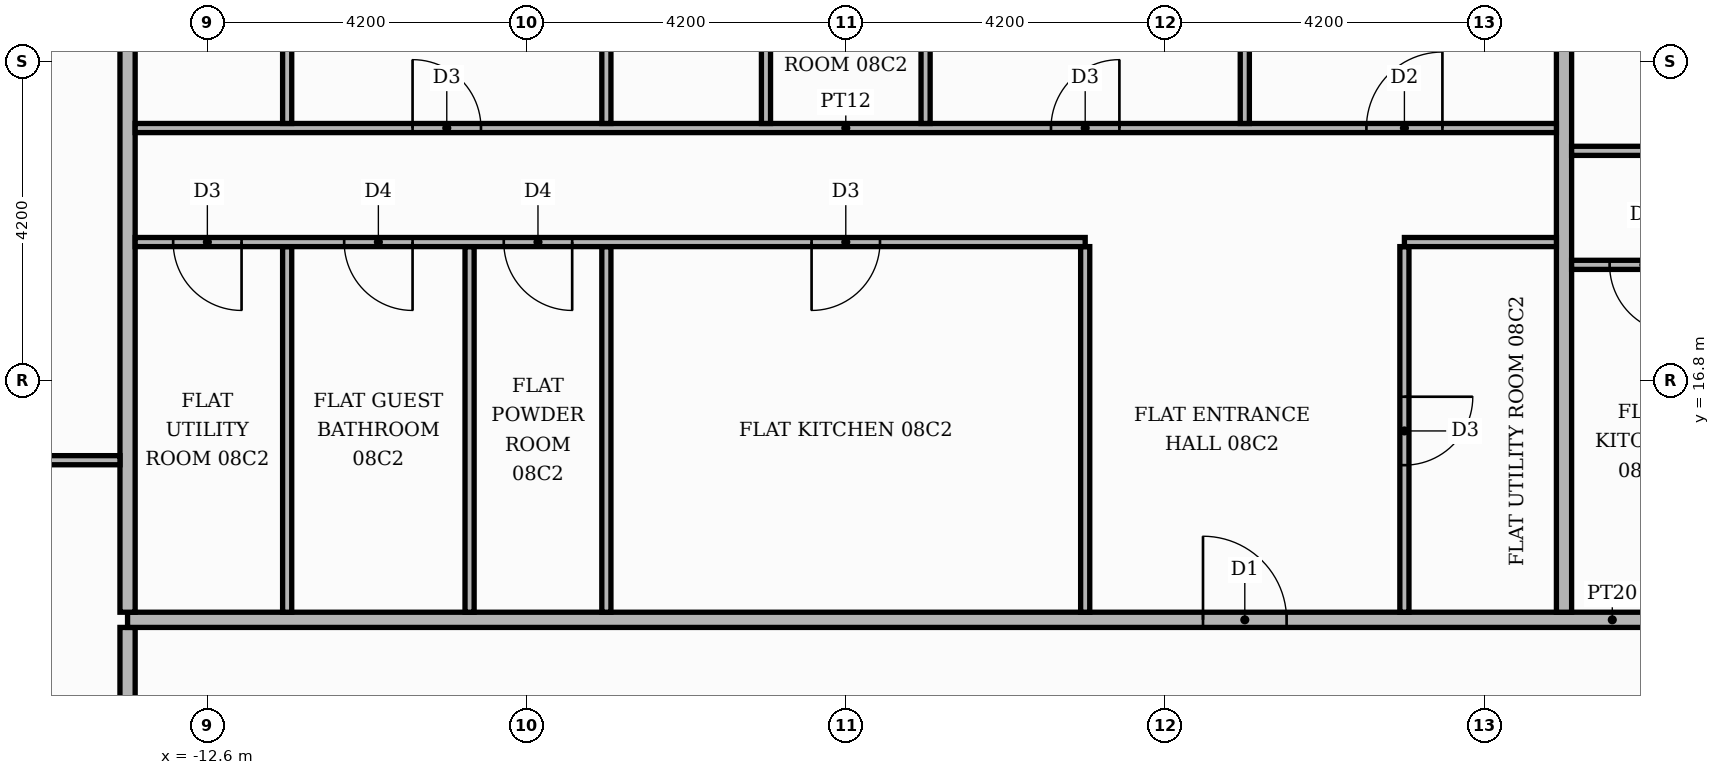
"""IFC4 building model, lengths in metres.
Left out: names, types, materials, properties, quantities, classifications, styles, units other than length and angle.
Written with IfcOpenShell. Run it as: python <this file> out.ifc"""

import sys

from ifc_helpers import new_model, si_unit, direction, frame, frame_2d, origin, place, context, subcontext, project, spatial, rectangle, extrude, element, fill, save


model = new_model("IFC4")
c1 = context("Model", 3, precision=1e-05, world=origin(), true_north=direction((0.0, 1.0)))
c2 = subcontext(c1, "Body", "Model", "MODEL_VIEW")
j1 = project(units=[si_unit("LENGTHUNIT", "METRE"), si_unit("PLANEANGLEUNIT", "RADIAN")], contexts=[c1])
p1 = place(None, origin())
s1 = spatial("IfcSite", under=j1, at=p1, CompositionType="ELEMENT")
p2 = place(p1, origin())
s2 = spatial("IfcBuilding", under=s1, at=p2, CompositionType="ELEMENT")
p3 = place(p2, frame((0.0, 0.0, 38.7)))
s3 = spatial("IfcBuildingStorey", under=s2, at=p3, CompositionType="ELEMENT", Elevation=38.7)
p4 = place(p3, frame((-13.65, -13.55, 0.0), z_axis=(0.0, 0.0, 1.0), x_axis=(0.0, 1.0, 0.0)))
e1 = element("IfcWall", 1, at=p4, inside=s3, PredefinedType="PARTITIONING", context=c2, shape_type="SweptSolid", body=[
    extrude(rectangle(XDim=27.1, YDim=0.2, at=frame_2d((13.55, 0.0))), origin(), (0.0, 0.0, 1.0), 3.48),
])
p5 = place(p4, frame((24.55, 0.0, 0.0)))
e2 = element("IfcOpeningElement", 2, at=p5, cuts=e1, PredefinedType="OPENING", context=c2, shape_type="SweptSolid", body=[
    extrude(rectangle(XDim=1.1, YDim=2.4, at=frame_2d((0.55, 1.2))), frame((0.0, 0.11, 0.0), z_axis=(0.0, -1.0, 0.0), x_axis=(1.0, 0.0, 0.0)), (0.0, 0.0, 1.0), 0.22),
])
p6 = place(p3, frame((-13.65, 13.65, 0.0), z_axis=(0.0, 0.0, 1.0), x_axis=(1.0, 0.0, 0.0)))
e3 = element("IfcWall", 3, at=p6, inside=s3, PredefinedType="PARTITIONING", context=c2, shape_type="SweptSolid", body=[
    extrude(rectangle(XDim=39.07, YDim=0.2, at=frame_2d((19.535, 0.0))), origin(), (0.0, 0.0, 1.0), 3.48),
])
p7 = place(p6, frame((24.65, 0.0, 0.0)))
e4 = element("IfcOpeningElement", 4, at=p7, cuts=e3, PredefinedType="OPENING", context=c2, shape_type="SweptSolid", body=[
    extrude(rectangle(XDim=1.1, YDim=2.4, at=frame_2d((0.55, 1.2))), frame((0.0, 0.11, 0.0), z_axis=(0.0, -1.0, 0.0), x_axis=(1.0, 0.0, 0.0)), (0.0, 0.0, 1.0), 0.22),
])
p8 = place(p6, frame((14.15, 0.0, 0.0)))
e5 = element("IfcOpeningElement", 5, at=p8, cuts=e3, PredefinedType="OPENING", context=c2, shape_type="SweptSolid", body=[
    extrude(rectangle(XDim=1.1, YDim=2.4, at=frame_2d((0.55, 1.2))), frame((0.0, 0.11, 0.0), z_axis=(0.0, -1.0, 0.0), x_axis=(1.0, 0.0, 0.0)), (0.0, 0.0, 1.0), 0.22),
])
p9 = place(p3, frame((-13.65, 13.75, 0.0), z_axis=(0.0, 0.0, 1.0), x_axis=(0.0, 1.0, 0.0)))
e6 = element("IfcWall", 6, at=p9, inside=s3, PredefinedType="PARTITIONING", context=c2, shape_type="SweptSolid", body=[
    extrude(rectangle(XDim=11.67, YDim=0.2, at=frame_2d((5.835, 0.0))), origin(), (0.0, 0.0, 1.0), 3.48),
])
for number, where, z_axis, x_axis in (
    (7, (-11.55, 13.75, 0.0), (0.0, 0.0, 1.0), (0.0, 1.0, 0.0)),
    (8, (-9.15, 13.75, 0.0), (0.0, 0.0, 1.0), (0.0, 1.0, 0.0)),
    (9, (-7.35, 13.75, 0.0), (0.0, 0.0, 1.0), (0.0, 1.0, 0.0)),
    (10, (-1.05, 13.75, 0.0), (0.0, 0.0, 1.0), (0.0, 1.0, 0.0)),
):
    element("IfcWall", number, at=place(p3, frame(where, z_axis=z_axis, x_axis=x_axis)), inside=s3, PredefinedType="PARTITIONING", context=c2, shape_type="SweptSolid", body=[
        extrude(rectangle(XDim=4.81, YDim=0.12, at=frame_2d((2.405, 0.0))), origin(), (0.0, 0.0, 1.0), 3.48),
    ])
p10 = place(p3, frame((3.15, 13.75, 0.0), z_axis=(0.0, 0.0, 1.0), x_axis=(0.0, 1.0, 0.0)))
e11 = element("IfcWall", 11, at=p10, inside=s3, PredefinedType="PARTITIONING", context=c2, shape_type="SweptSolid", body=[
    extrude(rectangle(XDim=4.81, YDim=0.12, at=frame_2d((2.405, 0.0))), origin(), (0.0, 0.0, 1.0), 3.48),
])
p11 = place(p10, frame((1.935, 0.0, 0.0)))
e12 = element("IfcOpeningElement", 12, at=p11, cuts=e11, PredefinedType="OPENING", context=c2, shape_type="SweptSolid", body=[
    extrude(rectangle(XDim=0.9, YDim=2.1, at=frame_2d((0.45, 1.05))), frame((0.0, 0.07, 0.0), z_axis=(0.0, -1.0, 0.0), x_axis=(1.0, 0.0, 0.0)), (0.0, 0.0, 1.0), 0.14),
])
p12 = place(p3, frame((5.25, 13.75, 0.0), z_axis=(0.0, 0.0, 1.0), x_axis=(0.0, 1.0, 0.0)))
e13 = element("IfcWall", 13, at=p12, inside=s3, PredefinedType="PARTITIONING", context=c2, shape_type="SweptSolid", body=[
    extrude(rectangle(XDim=11.67, YDim=0.2, at=frame_2d((5.835, 0.0))), origin(), (0.0, 0.0, 1.0), 3.48),
])
p13 = place(p3, frame((-20.72, 15.75, 0.0), z_axis=(0.0, 0.0, 1.0), x_axis=(1.0, 0.0, 0.0)))
e14 = element("IfcWall", 14, at=p13, inside=s3, PredefinedType="PARTITIONING", context=c2, shape_type="SweptSolid", body=[
    extrude(rectangle(XDim=6.97, YDim=0.12, at=frame_2d((3.485, 0.0))), origin(), (0.0, 0.0, 1.0), 3.48),
])
p14 = place(p13, frame((3.085, 0.0, 0.0)))
e15 = element("IfcOpeningElement", 15, at=p14, cuts=e14, PredefinedType="OPENING", context=c2, shape_type="SweptSolid", body=[
    extrude(rectangle(XDim=0.9, YDim=2.1, at=frame_2d((0.45, 1.05))), frame((0.0, 0.07, 0.0), z_axis=(0.0, -1.0, 0.0), x_axis=(1.0, 0.0, 0.0)), (0.0, 0.0, 1.0), 0.14),
])
p15 = place(p3, frame((5.35, 18.32, 0.0), z_axis=(0.0, 0.0, 1.0), x_axis=(1.0, 0.0, 0.0)))
e16 = element("IfcWall", 16, at=p15, inside=s3, PredefinedType="PARTITIONING", context=c2, shape_type="SweptSolid", body=[
    extrude(rectangle(XDim=4.1, YDim=0.12, at=frame_2d((2.05, 0.0))), origin(), (0.0, 0.0, 1.0), 3.48),
])
p16 = place(p15, frame((0.5, 0.0, 0.0)))
e17 = element("IfcOpeningElement", 17, at=p16, cuts=e16, PredefinedType="OPENING", context=c2, shape_type="SweptSolid", body=[
    extrude(rectangle(XDim=0.9, YDim=2.1, at=frame_2d((0.45, 1.05))), frame((0.0, 0.07, 0.0), z_axis=(0.0, -1.0, 0.0), x_axis=(1.0, 0.0, 0.0)), (0.0, 0.0, 1.0), 0.14),
])
p17 = place(p3, frame((-13.55, 18.62, 0.0), z_axis=(0.0, 0.0, 1.0), x_axis=(1.0, 0.0, 0.0)))
e18 = element("IfcWall", 18, at=p17, inside=s3, PredefinedType="PARTITIONING", context=c2, shape_type="SweptSolid", body=[
    extrude(rectangle(XDim=12.5, YDim=0.12, at=frame_2d((6.25, 0.0))), origin(), (0.0, 0.0, 1.0), 3.48),
])
p18 = place(p17, frame((8.9, 0.0, 0.0)))
e19 = element("IfcOpeningElement", 19, at=p18, cuts=e18, PredefinedType="OPENING", context=c2, shape_type="SweptSolid", body=[
    extrude(rectangle(XDim=0.9, YDim=2.1, at=frame_2d((0.45, 1.05))), frame((0.0, 0.07, 0.0), z_axis=(0.0, -1.0, 0.0), x_axis=(1.0, 0.0, 0.0)), (0.0, 0.0, 1.0), 0.14),
])
p19 = place(p17, frame((4.85, 0.0, 0.0)))
e20 = element("IfcOpeningElement", 20, at=p19, cuts=e18, PredefinedType="OPENING", context=c2, shape_type="SweptSolid", body=[
    extrude(rectangle(XDim=0.9, YDim=2.1, at=frame_2d((0.45, 1.05))), frame((0.0, 0.07, 0.0), z_axis=(0.0, -1.0, 0.0), x_axis=(1.0, 0.0, 0.0)), (0.0, 0.0, 1.0), 0.14),
])
p20 = place(p17, frame((2.75, 0.0, 0.0)))
e21 = element("IfcOpeningElement", 21, at=p20, cuts=e18, PredefinedType="OPENING", context=c2, shape_type="SweptSolid", body=[
    extrude(rectangle(XDim=0.9, YDim=2.1, at=frame_2d((0.45, 1.05))), frame((0.0, 0.07, 0.0), z_axis=(0.0, -1.0, 0.0), x_axis=(1.0, 0.0, 0.0)), (0.0, 0.0, 1.0), 0.14),
])
p21 = place(p17, frame((0.5, 0.0, 0.0)))
e22 = element("IfcOpeningElement", 22, at=p21, cuts=e18, PredefinedType="OPENING", context=c2, shape_type="SweptSolid", body=[
    extrude(rectangle(XDim=0.9, YDim=2.1, at=frame_2d((0.45, 1.05))), frame((0.0, 0.07, 0.0), z_axis=(0.0, -1.0, 0.0), x_axis=(1.0, 0.0, 0.0)), (0.0, 0.0, 1.0), 0.14),
])
p22 = place(p3, frame((3.15, 18.62, 0.0), z_axis=(0.0, 0.0, 1.0), x_axis=(1.0, 0.0, 0.0)))
e23 = element("IfcWall", 23, at=p22, inside=s3, PredefinedType="PARTITIONING", context=c2, shape_type="SweptSolid", body=[
    extrude(rectangle(XDim=2.0, YDim=0.12, at=frame_2d((1.0, 0.0))), origin(), (0.0, 0.0, 1.0), 3.48),
])
p23 = place(p3, frame((5.35, 19.82, 0.0), z_axis=(0.0, 0.0, 1.0), x_axis=(1.0, 0.0, 0.0)))
e24 = element("IfcWall", 24, at=p23, inside=s3, PredefinedType="PARTITIONING", context=c2, shape_type="SweptSolid", body=[
    extrude(rectangle(XDim=11.95, YDim=0.12, at=frame_2d((5.975, 0.0))), origin(), (0.0, 0.0, 1.0), 3.48),
])
p24 = place(p23, frame((8.85, 0.0, 0.0)))
e25 = element("IfcOpeningElement", 25, at=p24, cuts=e24, PredefinedType="OPENING", context=c2, shape_type="SweptSolid", body=[
    extrude(rectangle(XDim=1.0, YDim=2.1, at=frame_2d((0.5, 1.05))), frame((0.0, 0.07, 0.0), z_axis=(0.0, -1.0, 0.0), x_axis=(1.0, 0.0, 0.0)), (0.0, 0.0, 1.0), 0.14),
])
p25 = place(p23, frame((5.75, 0.0, 0.0)))
e26 = element("IfcOpeningElement", 26, at=p25, cuts=e24, PredefinedType="OPENING", context=c2, shape_type="SweptSolid", body=[
    extrude(rectangle(XDim=0.9, YDim=2.1, at=frame_2d((0.45, 1.05))), frame((0.0, 0.07, 0.0), z_axis=(0.0, -1.0, 0.0), x_axis=(1.0, 0.0, 0.0)), (0.0, 0.0, 1.0), 0.14),
])
p26 = place(p3, frame((-13.55, 20.12, 0.0), z_axis=(0.0, 0.0, 1.0), x_axis=(1.0, 0.0, 0.0)))
e27 = element("IfcWall", 27, at=p26, inside=s3, PredefinedType="PARTITIONING", context=c2, shape_type="SweptSolid", body=[
    extrude(rectangle(XDim=18.7, YDim=0.12, at=frame_2d((9.35, 0.0))), origin(), (0.0, 0.0, 1.0), 3.48),
])
p27 = place(p26, frame((16.2, 0.0, 0.0)))
e28 = element("IfcOpeningElement", 28, at=p27, cuts=e27, PredefinedType="OPENING", context=c2, shape_type="SweptSolid", body=[
    extrude(rectangle(XDim=1.0, YDim=2.1, at=frame_2d((0.5, 1.05))), frame((0.0, 0.07, 0.0), z_axis=(0.0, -1.0, 0.0), x_axis=(1.0, 0.0, 0.0)), (0.0, 0.0, 1.0), 0.14),
])
p28 = place(p26, frame((12.05, 0.0, 0.0)))
e29 = element("IfcOpeningElement", 29, at=p28, cuts=e27, PredefinedType="OPENING", context=c2, shape_type="SweptSolid", body=[
    extrude(rectangle(XDim=0.9, YDim=2.1, at=frame_2d((0.45, 1.05))), frame((0.0, 0.07, 0.0), z_axis=(0.0, -1.0, 0.0), x_axis=(1.0, 0.0, 0.0)), (0.0, 0.0, 1.0), 0.14),
])
p29 = place(p26, frame((3.65, 0.0, 0.0)))
e30 = element("IfcOpeningElement", 30, at=p29, cuts=e27, PredefinedType="OPENING", context=c2, shape_type="SweptSolid", body=[
    extrude(rectangle(XDim=0.9, YDim=2.1, at=frame_2d((0.45, 1.05))), frame((0.0, 0.07, 0.0), z_axis=(0.0, -1.0, 0.0), x_axis=(1.0, 0.0, 0.0)), (0.0, 0.0, 1.0), 0.14),
])
p30 = place(p3, frame((-11.55, 20.18, 0.0), z_axis=(0.0, 0.0, 1.0), x_axis=(0.0, 1.0, 0.0)))
e31 = element("IfcWall", 31, at=p30, inside=s3, PredefinedType="PARTITIONING", context=c2, shape_type="SweptSolid", body=[
    extrude(rectangle(XDim=5.24, YDim=0.12, at=frame_2d((2.62, 0.0))), origin(), (0.0, 0.0, 1.0), 3.48),
])
p31 = place(p30, frame((2.29, 0.0, 0.0)))
e32 = element("IfcOpeningElement", 32, at=p31, cuts=e31, PredefinedType="OPENING", context=c2, shape_type="SweptSolid", body=[
    extrude(rectangle(XDim=0.9, YDim=2.1, at=frame_2d((0.45, 1.05))), frame((0.0, 0.07, 0.0), z_axis=(0.0, -1.0, 0.0), x_axis=(1.0, 0.0, 0.0)), (0.0, 0.0, 1.0), 0.14),
])
p32 = place(p3, frame((-7.35, 20.18, 0.0), z_axis=(0.0, 0.0, 1.0), x_axis=(0.0, 1.0, 0.0)))
e33 = element("IfcWall", 33, at=p32, inside=s3, PredefinedType="PARTITIONING", context=c2, shape_type="SweptSolid", body=[
    extrude(rectangle(XDim=5.24, YDim=0.12, at=frame_2d((2.62, 0.0))), origin(), (0.0, 0.0, 1.0), 3.48),
])
p33 = place(p3, frame((-5.25, 20.18, 0.0), z_axis=(0.0, 0.0, 1.0), x_axis=(0.0, 1.0, 0.0)))
e34 = element("IfcWall", 34, at=p33, inside=s3, PredefinedType="PARTITIONING", context=c2, shape_type="SweptSolid", body=[
    extrude(rectangle(XDim=5.24, YDim=0.12, at=frame_2d((2.62, 0.0))), origin(), (0.0, 0.0, 1.0), 3.48),
])
p34 = place(p33, frame((2.29, 0.0, 0.0)))
e35 = element("IfcOpeningElement", 35, at=p34, cuts=e34, PredefinedType="OPENING", context=c2, shape_type="SweptSolid", body=[
    extrude(rectangle(XDim=0.9, YDim=2.1, at=frame_2d((0.45, 1.05))), frame((0.0, 0.07, 0.0), z_axis=(0.0, -1.0, 0.0), x_axis=(1.0, 0.0, 0.0)), (0.0, 0.0, 1.0), 0.14),
])
p35 = place(p3, frame((-3.15, 20.18, 0.0), z_axis=(0.0, 0.0, 1.0), x_axis=(0.0, 1.0, 0.0)))
e36 = element("IfcWall", 36, at=p35, inside=s3, PredefinedType="PARTITIONING", context=c2, shape_type="SweptSolid", body=[
    extrude(rectangle(XDim=5.24, YDim=0.12, at=frame_2d((2.62, 0.0))), origin(), (0.0, 0.0, 1.0), 3.48),
])
p36 = place(p35, frame((2.29, 0.0, 0.0)))
e37 = element("IfcOpeningElement", 37, at=p36, cuts=e36, PredefinedType="OPENING", context=c2, shape_type="SweptSolid", body=[
    extrude(rectangle(XDim=0.9, YDim=2.1, at=frame_2d((0.45, 1.05))), frame((0.0, 0.07, 0.0), z_axis=(0.0, -1.0, 0.0), x_axis=(1.0, 0.0, 0.0)), (0.0, 0.0, 1.0), 0.14),
])
p37 = place(p3, frame((1.05, 20.18, 0.0), z_axis=(0.0, 0.0, 1.0), x_axis=(0.0, 1.0, 0.0)))
e38 = element("IfcWall", 38, at=p37, inside=s3, PredefinedType="PARTITIONING", context=c2, shape_type="SweptSolid", body=[
    extrude(rectangle(XDim=5.24, YDim=0.12, at=frame_2d((2.62, 0.0))), origin(), (0.0, 0.0, 1.0), 3.48),
])
p38 = place(p16, frame((0.9, 0.0, 0.0), z_axis=(0.0, 0.0, 1.0), x_axis=(-1.0, 0.0, 0.0)))
e39 = element("IfcDoor", 39, at=p38, inside=s3, OperationType="SINGLE_SWING_RIGHT", PredefinedType="DOOR", context=c2, shape_type="SweptSolid", body=[
    extrude(rectangle(XDim=0.9, YDim=2.1, at=frame_2d((0.45, 1.05))), frame((0.0, 0.025, 0.0), z_axis=(0.0, -1.0, 0.0), x_axis=(1.0, 0.0, 0.0)), (0.0, 0.0, 1.0), 0.05),
])
fill(e17, e39)
p39 = place(p8, origin())
e40 = element("IfcDoor", 40, at=p39, inside=s3, OperationType="SINGLE_SWING_LEFT", PredefinedType="DOOR", context=c2, shape_type="SweptSolid", body=[
    extrude(rectangle(XDim=1.1, YDim=2.4, at=frame_2d((0.55, 1.2))), frame((0.0, 0.025, 0.0), z_axis=(0.0, -1.0, 0.0), x_axis=(1.0, 0.0, 0.0)), (0.0, 0.0, 1.0), 0.05),
])
fill(e5, e40)
p40 = place(p11, frame((0.9, 0.0, 0.0), z_axis=(0.0, 0.0, 1.0), x_axis=(-1.0, 0.0, 0.0)))
e41 = element("IfcDoor", 41, at=p40, inside=s3, OperationType="SINGLE_SWING_RIGHT", PredefinedType="DOOR", context=c2, shape_type="SweptSolid", body=[
    extrude(rectangle(XDim=0.9, YDim=2.1, at=frame_2d((0.45, 1.05))), frame((0.0, 0.025, 0.0), z_axis=(0.0, -1.0, 0.0), x_axis=(1.0, 0.0, 0.0)), (0.0, 0.0, 1.0), 0.05),
])
fill(e12, e41)
p41 = place(p18, frame((0.9, 0.0, 0.0), z_axis=(0.0, 0.0, 1.0), x_axis=(-1.0, 0.0, 0.0)))
e42 = element("IfcDoor", 42, at=p41, inside=s3, OperationType="SINGLE_SWING_LEFT", PredefinedType="DOOR", context=c2, shape_type="SweptSolid", body=[
    extrude(rectangle(XDim=0.9, YDim=2.1, at=frame_2d((0.45, 1.05))), frame((0.0, 0.025, 0.0), z_axis=(0.0, -1.0, 0.0), x_axis=(1.0, 0.0, 0.0)), (0.0, 0.0, 1.0), 0.05),
])
fill(e19, e42)
p42 = place(p19, frame((0.9, 0.0, 0.0), z_axis=(0.0, 0.0, 1.0), x_axis=(-1.0, 0.0, 0.0)))
e43 = element("IfcDoor", 43, at=p42, inside=s3, OperationType="SINGLE_SWING_RIGHT", PredefinedType="DOOR", context=c2, shape_type="SweptSolid", body=[
    extrude(rectangle(XDim=0.9, YDim=2.1, at=frame_2d((0.45, 1.05))), frame((0.0, 0.025, 0.0), z_axis=(0.0, -1.0, 0.0), x_axis=(1.0, 0.0, 0.0)), (0.0, 0.0, 1.0), 0.05),
])
fill(e20, e43)
p43 = place(p20, frame((0.9, 0.0, 0.0), z_axis=(0.0, 0.0, 1.0), x_axis=(-1.0, 0.0, 0.0)))
e44 = element("IfcDoor", 44, at=p43, inside=s3, OperationType="SINGLE_SWING_RIGHT", PredefinedType="DOOR", context=c2, shape_type="SweptSolid", body=[
    extrude(rectangle(XDim=0.9, YDim=2.1, at=frame_2d((0.45, 1.05))), frame((0.0, 0.025, 0.0), z_axis=(0.0, -1.0, 0.0), x_axis=(1.0, 0.0, 0.0)), (0.0, 0.0, 1.0), 0.05),
])
fill(e21, e44)
p44 = place(p21, frame((0.9, 0.0, 0.0), z_axis=(0.0, 0.0, 1.0), x_axis=(-1.0, 0.0, 0.0)))
e45 = element("IfcDoor", 45, at=p44, inside=s3, OperationType="SINGLE_SWING_RIGHT", PredefinedType="DOOR", context=c2, shape_type="SweptSolid", body=[
    extrude(rectangle(XDim=0.9, YDim=2.1, at=frame_2d((0.45, 1.05))), frame((0.0, 0.025, 0.0), z_axis=(0.0, -1.0, 0.0), x_axis=(1.0, 0.0, 0.0)), (0.0, 0.0, 1.0), 0.05),
])
fill(e22, e45)
p45 = place(p27, origin())
e46 = element("IfcDoor", 46, at=p45, inside=s3, OperationType="SINGLE_SWING_RIGHT", PredefinedType="DOOR", context=c2, shape_type="SweptSolid", body=[
    extrude(rectangle(XDim=1.0, YDim=2.1, at=frame_2d((0.5, 1.05))), frame((0.0, 0.025, 0.0), z_axis=(0.0, -1.0, 0.0), x_axis=(1.0, 0.0, 0.0)), (0.0, 0.0, 1.0), 0.05),
])
fill(e28, e46)
p46 = place(p28, origin())
e47 = element("IfcDoor", 47, at=p46, inside=s3, OperationType="SINGLE_SWING_RIGHT", PredefinedType="DOOR", context=c2, shape_type="SweptSolid", body=[
    extrude(rectangle(XDim=0.9, YDim=2.1, at=frame_2d((0.45, 1.05))), frame((0.0, 0.025, 0.0), z_axis=(0.0, -1.0, 0.0), x_axis=(1.0, 0.0, 0.0)), (0.0, 0.0, 1.0), 0.05),
])
fill(e29, e47)
p47 = place(p29, origin())
e48 = element("IfcDoor", 48, at=p47, inside=s3, OperationType="SINGLE_SWING_LEFT", PredefinedType="DOOR", context=c2, shape_type="SweptSolid", body=[
    extrude(rectangle(XDim=0.9, YDim=2.1, at=frame_2d((0.45, 1.05))), frame((0.0, 0.025, 0.0), z_axis=(0.0, -1.0, 0.0), x_axis=(1.0, 0.0, 0.0)), (0.0, 0.0, 1.0), 0.05),
])
fill(e30, e48)
save(model, sys.argv[1])
